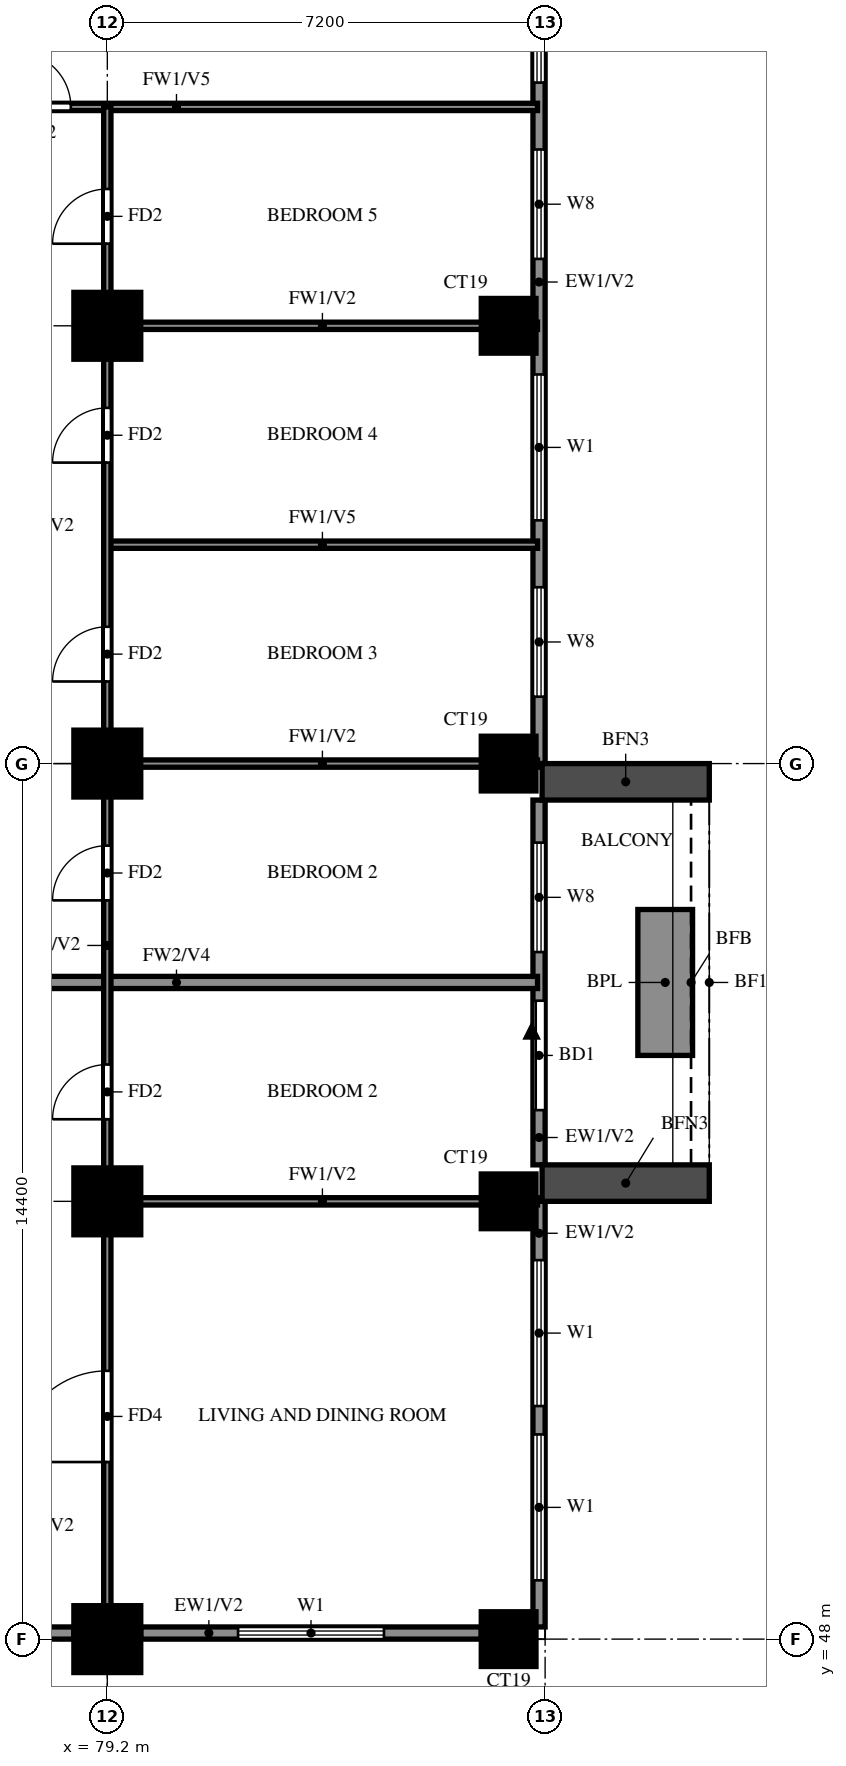
"""IFC4 building model, lengths in metres.
Left out: names, types, materials, properties, quantities, classifications, styles, units other than length and angle.
Written with IfcOpenShell. Run it as: python <this file> out.ifc"""

import sys

from ifc_helpers import new_model, si_unit, direction, frame, frame_2d, origin, origin_2d, place, context, subcontext, project, spatial, rectangle, extrude, source, transform, mapped, element, fill, save


model = new_model("IFC4")
c1 = context("Model", 3, precision=1e-05, world=origin(), true_north=direction((0.0, 1.0)))
c2 = subcontext(c1, "Body", "Model", "MODEL_VIEW")
j1 = project(units=[si_unit("LENGTHUNIT", "METRE"), si_unit("PLANEANGLEUNIT", "RADIAN")], contexts=[c1])
p1 = place(None, origin())
s1 = spatial("IfcSite", under=j1, at=p1, CompositionType="ELEMENT")
p2 = place(p1, origin())
s2 = spatial("IfcBuilding", under=s1, at=p2, CompositionType="ELEMENT")
p3 = place(p2, frame((0.0, 0.0, 123.5)))
s3 = spatial("IfcBuildingStorey", under=s2, at=p3, CompositionType="ELEMENT", Elevation=123.5)
m1 = source(origin(), c2, "Body", "SweptSolid", [
    extrude(rectangle(XDim=1.1, YDim=1.1, at=origin_2d()), origin(), (0.0, 0.0, 1.0), 3.2),
])
p4 = place(p3, frame((79.2, 48.0, 0.0), z_axis=(0.0, 0.0, 1.0), x_axis=(1.0, 0.0, 0.0)))
e1 = element("IfcColumn", 1, at=p4, inside=s3, PredefinedType="COLUMN", context=c2, shape_type="MappedRepresentation", body=[
    mapped(m1, transform((0.0, 0.0, 0.0))),
])
m2 = source(origin(), c2, "Body", "SweptSolid", [
    extrude(rectangle(XDim=0.9, YDim=0.9, at=origin_2d()), origin(), (0.0, 0.0, 1.0), 3.2),
])
p5 = place(p3, frame((85.8, 48.0, 0.0), z_axis=(0.0, 0.0, 1.0), x_axis=(1.0, 0.0, 0.0)))
e2 = element("IfcColumn", 2, at=p5, inside=s3, PredefinedType="COLUMN", context=c2, shape_type="MappedRepresentation", body=[
    mapped(m2, transform((0.0, 0.0, 0.0))),
])
p6 = place(p3, frame((79.2, 55.2, 0.0), z_axis=(0.0, 0.0, 1.0), x_axis=(1.0, 0.0, 0.0)))
e3 = element("IfcColumn", 3, at=p6, inside=s3, PredefinedType="COLUMN", context=c2, shape_type="MappedRepresentation", body=[
    mapped(m1, transform((0.0, 0.0, 0.0))),
])
p7 = place(p3, frame((85.8, 55.2, 0.0), z_axis=(0.0, 0.0, 1.0), x_axis=(1.0, 0.0, 0.0)))
e4 = element("IfcColumn", 4, at=p7, inside=s3, PredefinedType="COLUMN", context=c2, shape_type="MappedRepresentation", body=[
    mapped(m2, transform((0.0, 0.0, 0.0))),
])
p8 = place(p3, frame((79.2, 62.4, 0.0), z_axis=(0.0, 0.0, 1.0), x_axis=(1.0, 0.0, 0.0)))
e5 = element("IfcColumn", 5, at=p8, inside=s3, PredefinedType="COLUMN", context=c2, shape_type="MappedRepresentation", body=[
    mapped(m1, transform((0.0, 0.0, 0.0))),
])
p9 = place(p3, frame((85.8, 62.4, 0.0), z_axis=(0.0, 0.0, 1.0), x_axis=(1.0, 0.0, 0.0)))
e6 = element("IfcColumn", 6, at=p9, inside=s3, PredefinedType="COLUMN", context=c2, shape_type="MappedRepresentation", body=[
    mapped(m2, transform((0.0, 0.0, 0.0))),
])
p10 = place(p3, frame((79.2, 69.6, 0.0), z_axis=(0.0, 0.0, 1.0), x_axis=(1.0, 0.0, 0.0)))
e7 = element("IfcColumn", 7, at=p10, inside=s3, PredefinedType="COLUMN", context=c2, shape_type="MappedRepresentation", body=[
    mapped(m1, transform((0.0, 0.0, 0.0))),
])
p11 = place(p3, frame((85.8, 69.6, 0.0), z_axis=(0.0, 0.0, 1.0), x_axis=(1.0, 0.0, 0.0)))
e8 = element("IfcColumn", 8, at=p11, inside=s3, PredefinedType="COLUMN", context=c2, shape_type="MappedRepresentation", body=[
    mapped(m2, transform((0.0, 0.0, 0.0))),
])
p12 = place(p3, frame((85.719, 39.881, 0.0), z_axis=(0.0, 0.0, 1.0), x_axis=(-0.86377618652, 0.503875678716, 0.0)))
e9 = element("IfcWall", 9, at=p12, inside=s3, PredefinedType="SOLIDWALL", context=c2, shape_type="SweptSolid", body=[
    extrude(rectangle(XDim=16.311, YDim=0.2, at=frame_2d((8.156, 0.0))), origin(), (0.0, 0.0, 1.0), 3.2),
])
p13 = place(p12, frame((13.326, 0.0, 1.5)))
e10 = element("IfcOpeningElement", 10, at=p13, cuts=e9, PredefinedType="OPENING", context=c2, shape_type="SweptSolid", body=[
    extrude(rectangle(XDim=0.9, YDim=0.9, at=frame_2d((0.45, 0.45))), frame((0.0, 0.11, 0.0), z_axis=(0.0, -1.0, 0.0), x_axis=(1.0, 0.0, 0.0)), (0.0, 0.0, 1.0), 0.22),
])
p14 = place(p3, frame((71.99, 48.1, 0.0), z_axis=(0.0, 0.0, 1.0), x_axis=(1.0, 0.0, 0.0)))
e11 = element("IfcWall", 11, at=p14, inside=s3, PredefinedType="SOLIDWALL", context=c2, shape_type="SweptSolid", body=[
    extrude(rectangle(XDim=6.66, YDim=0.2, at=frame_2d((3.33, 0.0))), origin(), (0.0, 0.0, 1.0), 3.2),
])
p15 = place(p3, frame((79.75, 48.1, 0.0), z_axis=(0.0, 0.0, 1.0), x_axis=(1.0, 0.0, 0.0)))
e12 = element("IfcWall", 12, at=p15, inside=s3, PredefinedType="SOLIDWALL", context=c2, shape_type="SweptSolid", body=[
    extrude(rectangle(XDim=5.6, YDim=0.2, at=frame_2d((2.8, 0.0))), origin(), (0.0, 0.0, 1.0), 3.2),
])
p16 = place(p15, frame((1.6, 0.0, 0.6)))
e13 = element("IfcOpeningElement", 13, at=p16, cuts=e12, PredefinedType="OPENING", context=c2, shape_type="SweptSolid", body=[
    extrude(rectangle(XDim=2.4, YDim=2.4, at=frame_2d((1.2, 1.2))), frame((0.0, 0.11, 0.0), z_axis=(0.0, -1.0, 0.0), x_axis=(1.0, 0.0, 0.0)), (0.0, 0.0, 1.0), 0.22),
])
p17 = place(p3, frame((86.3, 48.2, 0.0), z_axis=(0.0, 0.0, 1.0), x_axis=(0.0, 1.0, 0.0)))
e14 = element("IfcWall", 14, at=p17, inside=s3, PredefinedType="SOLIDWALL", context=c2, shape_type="SweptSolid", body=[
    extrude(rectangle(XDim=7.0, YDim=0.2, at=frame_2d((3.5, 0.0))), origin(), (0.0, 0.0, 1.0), 3.2),
])
p18 = place(p17, frame((0.767, 0.0, 0.6)))
e15 = element("IfcOpeningElement", 15, at=p18, cuts=e14, PredefinedType="OPENING", context=c2, shape_type="SweptSolid", body=[
    extrude(rectangle(XDim=2.4, YDim=2.4, at=frame_2d((1.2, 1.2))), frame((0.0, 0.11, 0.0), z_axis=(0.0, -1.0, 0.0), x_axis=(1.0, 0.0, 0.0)), (0.0, 0.0, 1.0), 0.22),
])
p19 = place(p17, frame((3.633, 0.0, 0.6)))
e16 = element("IfcOpeningElement", 16, at=p19, cuts=e14, PredefinedType="OPENING", context=c2, shape_type="SweptSolid", body=[
    extrude(rectangle(XDim=2.4, YDim=2.4, at=frame_2d((1.2, 1.2))), frame((0.0, 0.11, 0.0), z_axis=(0.0, -1.0, 0.0), x_axis=(1.0, 0.0, 0.0)), (0.0, 0.0, 1.0), 0.22),
])
p20 = place(p3, frame((86.3, 55.8, 0.0), z_axis=(0.0, 0.0, 1.0), x_axis=(0.0, 1.0, 0.0)))
e17 = element("IfcWall", 17, at=p20, inside=s3, PredefinedType="SOLIDWALL", context=c2, shape_type="SweptSolid", body=[
    extrude(rectangle(XDim=6.0, YDim=0.2, at=frame_2d((3.0, 0.0))), origin(), (0.0, 0.0, 1.0), 3.2),
])
p21 = place(p20, frame((0.9, 0.0, 0.0)))
e18 = element("IfcOpeningElement", 18, at=p21, cuts=e17, PredefinedType="OPENING", context=c2, shape_type="SweptSolid", body=[
    extrude(rectangle(XDim=1.8, YDim=2.4, at=frame_2d((0.9, 1.2))), frame((0.0, 0.11, 0.0), z_axis=(0.0, -1.0, 0.0), x_axis=(1.0, 0.0, 0.0)), (0.0, 0.0, 1.0), 0.22),
])
p22 = place(p20, frame((3.5, 0.0, 0.6)))
e19 = element("IfcOpeningElement", 19, at=p22, cuts=e17, PredefinedType="OPENING", context=c2, shape_type="SweptSolid", body=[
    extrude(rectangle(XDim=1.8, YDim=2.4, at=frame_2d((0.9, 1.2))), frame((0.0, 0.11, 0.0), z_axis=(0.0, -1.0, 0.0), x_axis=(1.0, 0.0, 0.0)), (0.0, 0.0, 1.0), 0.22),
])
p23 = place(p3, frame((86.3, 62.4, 0.0), z_axis=(0.0, 0.0, 1.0), x_axis=(0.0, 1.0, 0.0)))
e20 = element("IfcWall", 20, at=p23, inside=s3, PredefinedType="SOLIDWALL", context=c2, shape_type="SweptSolid", body=[
    extrude(rectangle(XDim=14.4, YDim=0.2, at=frame_2d((7.2, 0.0))), origin(), (0.0, 0.0, 1.0), 3.2),
])
p24 = place(p23, frame((1.1, 0.0, 0.6)))
e21 = element("IfcOpeningElement", 21, at=p24, cuts=e20, PredefinedType="OPENING", context=c2, shape_type="SweptSolid", body=[
    extrude(rectangle(XDim=1.8, YDim=2.4, at=frame_2d((0.9, 1.2))), frame((0.0, 0.11, 0.0), z_axis=(0.0, -1.0, 0.0), x_axis=(1.0, 0.0, 0.0)), (0.0, 0.0, 1.0), 0.22),
])
p25 = place(p23, frame((4.0, 0.0, 0.6)))
e22 = element("IfcOpeningElement", 22, at=p25, cuts=e20, PredefinedType="OPENING", context=c2, shape_type="SweptSolid", body=[
    extrude(rectangle(XDim=2.4, YDim=2.4, at=frame_2d((1.2, 1.2))), frame((0.0, 0.11, 0.0), z_axis=(0.0, -1.0, 0.0), x_axis=(1.0, 0.0, 0.0)), (0.0, 0.0, 1.0), 0.22),
])
p26 = place(p23, frame((8.3, 0.0, 0.6)))
e23 = element("IfcOpeningElement", 23, at=p26, cuts=e20, PredefinedType="OPENING", context=c2, shape_type="SweptSolid", body=[
    extrude(rectangle(XDim=1.8, YDim=2.4, at=frame_2d((0.9, 1.2))), frame((0.0, 0.11, 0.0), z_axis=(0.0, -1.0, 0.0), x_axis=(1.0, 0.0, 0.0)), (0.0, 0.0, 1.0), 0.22),
])
p27 = place(p23, frame((11.2, 0.0, 0.6)))
e24 = element("IfcOpeningElement", 24, at=p27, cuts=e20, PredefinedType="OPENING", context=c2, shape_type="SweptSolid", body=[
    extrude(rectangle(XDim=2.4, YDim=2.4, at=frame_2d((1.2, 1.2))), frame((0.0, 0.11, 0.0), z_axis=(0.0, -1.0, 0.0), x_axis=(1.0, 0.0, 0.0)), (0.0, 0.0, 1.0), 0.22),
])
for number, where, z_axis, x_axis in (
    (25, (86.35, 55.5, 0.0), (0.0, 0.0, 1.0), (1.0, 0.0, 0.0)),
    (26, (86.35, 62.1, 0.0), (0.0, 0.0, 1.0), (1.0, 0.0, 0.0)),
):
    element("IfcWall", number, at=place(p3, frame(where, z_axis=z_axis, x_axis=x_axis)), inside=s3, PredefinedType="SOLIDWALL", context=c2, shape_type="SweptSolid", body=[
        extrude(rectangle(XDim=2.75, YDim=0.6, at=frame_2d((1.375, 0.0))), origin(), (0.0, 0.0, 1.0), 2.85),
    ])
p28 = place(p3, frame((88.375, 57.6, 0.0), z_axis=(0.0, 0.0, 1.0), x_axis=(0.0, 1.0, 0.0)))
e27 = element("IfcWall", 27, at=p28, inside=s3, PredefinedType="SOLIDWALL", context=c2, shape_type="SweptSolid", body=[
    extrude(rectangle(XDim=2.4, YDim=0.9, at=frame_2d((1.2, 0.0))), origin(), (0.0, 0.0, 1.0), 0.9),
])
p29 = place(p3, frame((74.4, 58.8, 0.0), z_axis=(0.0, 0.0, 1.0), x_axis=(1.0, 0.0, 0.0)))
e28 = element("IfcWall", 28, at=p29, inside=s3, PredefinedType="SOLIDWALL", context=c2, shape_type="SweptSolid", body=[
    extrude(rectangle(XDim=11.875, YDim=0.2, at=frame_2d((5.938, 0.0))), origin(), (0.0, 0.0, 1.0), 2.3),
])
for number, where, z_axis, x_axis in (
    (29, (79.2, 55.2, 0.0), (0.0, 0.0, 1.0), (1.0, 0.0, 0.0)),
    (30, (79.2, 62.4, 0.0), (0.0, 0.0, 1.0), (1.0, 0.0, 0.0)),
):
    element("IfcWall", number, at=place(p3, frame(where, z_axis=z_axis, x_axis=x_axis)), inside=s3, PredefinedType="PARTITIONING", context=c2, shape_type="SweptSolid", body=[
        extrude(rectangle(XDim=7.075, YDim=0.12, at=frame_2d((3.538, 0.0))), origin(), (0.0, 0.0, 1.0), 3.2),
    ])
p30 = place(p3, frame((79.2, 66.0, 0.0), z_axis=(0.0, 0.0, 1.0), x_axis=(1.0, 0.0, 0.0)))
e31 = element("IfcWall", 31, at=p30, inside=s3, PredefinedType="PARTITIONING", context=c2, shape_type="SweptSolid", body=[
    extrude(rectangle(XDim=7.075, YDim=0.12, at=frame_2d((3.538, 0.0))), origin(), (0.0, 0.0, 1.0), 2.3),
])
p31 = place(p3, frame((79.2, 69.6, 0.0), z_axis=(0.0, 0.0, 1.0), x_axis=(1.0, 0.0, 0.0)))
e32 = element("IfcWall", 32, at=p31, inside=s3, PredefinedType="PARTITIONING", context=c2, shape_type="SweptSolid", body=[
    extrude(rectangle(XDim=7.075, YDim=0.12, at=frame_2d((3.538, 0.0))), origin(), (0.0, 0.0, 1.0), 3.2),
])
p32 = place(p3, frame((74.4, 73.2, 0.0), z_axis=(0.0, 0.0, 1.0), x_axis=(1.0, 0.0, 0.0)))
e33 = element("IfcWall", 33, at=p32, inside=s3, PredefinedType="PARTITIONING", context=c2, shape_type="SweptSolid", body=[
    extrude(rectangle(XDim=11.875, YDim=0.12, at=frame_2d((5.938, 0.0))), origin(), (0.0, 0.0, 1.0), 2.3),
])
p33 = place(p32, frame((3.3, 0.0, 0.0)))
e34 = element("IfcOpeningElement", 34, at=p33, cuts=e33, PredefinedType="OPENING", context=c2, shape_type="SweptSolid", body=[
    extrude(rectangle(XDim=0.9, YDim=2.1, at=frame_2d((0.45, 1.05))), frame((0.0, 0.07, 0.0), z_axis=(0.0, -1.0, 0.0), x_axis=(1.0, 0.0, 0.0)), (0.0, 0.0, 1.0), 0.14),
])
p34 = place(p3, frame((79.2, 48.125, 0.0), z_axis=(0.0, 0.0, 1.0), x_axis=(0.0, 1.0, 0.0)))
e35 = element("IfcWall", 35, at=p34, inside=s3, PredefinedType="PARTITIONING", context=c2, shape_type="SweptSolid", body=[
    extrude(rectangle(XDim=25.075, YDim=0.12, at=frame_2d((12.538, 0.0))), origin(), (0.0, 0.0, 1.0), 3.2),
])
p35 = place(p34, frame((2.788, 0.0, 0.0)))
e36 = element("IfcOpeningElement", 36, at=p35, cuts=e35, PredefinedType="OPENING", context=c2, shape_type="SweptSolid", body=[
    extrude(rectangle(XDim=1.5, YDim=2.1, at=frame_2d((0.75, 1.05))), frame((0.0, 0.07, 0.0), z_axis=(0.0, -1.0, 0.0), x_axis=(1.0, 0.0, 0.0)), (0.0, 0.0, 1.0), 0.14),
])
p36 = place(p34, frame((8.425, 0.0, 0.0)))
e37 = element("IfcOpeningElement", 37, at=p36, cuts=e35, PredefinedType="OPENING", context=c2, shape_type="SweptSolid", body=[
    extrude(rectangle(XDim=0.9, YDim=2.1, at=frame_2d((0.45, 1.05))), frame((0.0, 0.07, 0.0), z_axis=(0.0, -1.0, 0.0), x_axis=(1.0, 0.0, 0.0)), (0.0, 0.0, 1.0), 0.14),
])
p37 = place(p34, frame((12.025, 0.0, 0.0)))
e38 = element("IfcOpeningElement", 38, at=p37, cuts=e35, PredefinedType="OPENING", context=c2, shape_type="SweptSolid", body=[
    extrude(rectangle(XDim=0.9, YDim=2.1, at=frame_2d((0.45, 1.05))), frame((0.0, 0.07, 0.0), z_axis=(0.0, -1.0, 0.0), x_axis=(1.0, 0.0, 0.0)), (0.0, 0.0, 1.0), 0.14),
])
p38 = place(p34, frame((15.625, 0.0, 0.0)))
e39 = element("IfcOpeningElement", 39, at=p38, cuts=e35, PredefinedType="OPENING", context=c2, shape_type="SweptSolid", body=[
    extrude(rectangle(XDim=0.9, YDim=2.1, at=frame_2d((0.45, 1.05))), frame((0.0, 0.07, 0.0), z_axis=(0.0, -1.0, 0.0), x_axis=(1.0, 0.0, 0.0)), (0.0, 0.0, 1.0), 0.14),
])
p39 = place(p34, frame((19.225, 0.0, 0.0)))
e40 = element("IfcOpeningElement", 40, at=p39, cuts=e35, PredefinedType="OPENING", context=c2, shape_type="SweptSolid", body=[
    extrude(rectangle(XDim=0.9, YDim=2.1, at=frame_2d((0.45, 1.05))), frame((0.0, 0.07, 0.0), z_axis=(0.0, -1.0, 0.0), x_axis=(1.0, 0.0, 0.0)), (0.0, 0.0, 1.0), 0.14),
])
p40 = place(p34, frame((22.825, 0.0, 0.0)))
e41 = element("IfcOpeningElement", 41, at=p40, cuts=e35, PredefinedType="OPENING", context=c2, shape_type="SweptSolid", body=[
    extrude(rectangle(XDim=0.9, YDim=2.1, at=frame_2d((0.45, 1.05))), frame((0.0, 0.07, 0.0), z_axis=(0.0, -1.0, 0.0), x_axis=(1.0, 0.0, 0.0)), (0.0, 0.0, 1.0), 0.14),
])
p41 = place(p16, origin())
e42 = element("IfcWindow", 42, at=p41, inside=s3, PartitioningType="DOUBLE_PANEL_VERTICAL", PredefinedType="WINDOW", context=c2, shape_type="SweptSolid", body=[
    extrude(rectangle(XDim=2.4, YDim=2.4, at=frame_2d((1.2, 1.2))), frame((0.0, 0.03, 0.0), z_axis=(0.0, -1.0, 0.0), x_axis=(1.0, 0.0, 0.0)), (0.0, 0.0, 1.0), 0.06),
])
fill(e13, e42)
p42 = place(p18, origin())
e43 = element("IfcWindow", 43, at=p42, inside=s3, PartitioningType="DOUBLE_PANEL_VERTICAL", PredefinedType="WINDOW", context=c2, shape_type="SweptSolid", body=[
    extrude(rectangle(XDim=2.4, YDim=2.4, at=frame_2d((1.2, 1.2))), frame((0.0, 0.03, 0.0), z_axis=(0.0, -1.0, 0.0), x_axis=(1.0, 0.0, 0.0)), (0.0, 0.0, 1.0), 0.06),
])
fill(e15, e43)
p43 = place(p19, origin())
e44 = element("IfcWindow", 44, at=p43, inside=s3, PartitioningType="DOUBLE_PANEL_VERTICAL", PredefinedType="WINDOW", context=c2, shape_type="SweptSolid", body=[
    extrude(rectangle(XDim=2.4, YDim=2.4, at=frame_2d((1.2, 1.2))), frame((0.0, 0.03, 0.0), z_axis=(0.0, -1.0, 0.0), x_axis=(1.0, 0.0, 0.0)), (0.0, 0.0, 1.0), 0.06),
])
fill(e16, e44)
p44 = place(p21, origin())
e45 = element("IfcDoor", 45, at=p44, inside=s3, OperationType="DOUBLE_DOOR_SLIDING", PredefinedType="DOOR", context=c2, shape_type="SweptSolid", body=[
    extrude(rectangle(XDim=1.8, YDim=2.4, at=frame_2d((0.9, 1.2))), frame((0.0, 0.025, 0.0), z_axis=(0.0, -1.0, 0.0), x_axis=(1.0, 0.0, 0.0)), (0.0, 0.0, 1.0), 0.05),
])
fill(e18, e45)
p45 = place(p22, origin())
e46 = element("IfcWindow", 46, at=p45, inside=s3, PartitioningType="DOUBLE_PANEL_VERTICAL", PredefinedType="WINDOW", context=c2, shape_type="SweptSolid", body=[
    extrude(rectangle(XDim=1.8, YDim=2.4, at=frame_2d((0.9, 1.2))), frame((0.0, 0.03, 0.0), z_axis=(0.0, -1.0, 0.0), x_axis=(1.0, 0.0, 0.0)), (0.0, 0.0, 1.0), 0.06),
])
fill(e19, e46)
p46 = place(p24, origin())
e47 = element("IfcWindow", 47, at=p46, inside=s3, PartitioningType="DOUBLE_PANEL_VERTICAL", PredefinedType="WINDOW", context=c2, shape_type="SweptSolid", body=[
    extrude(rectangle(XDim=1.8, YDim=2.4, at=frame_2d((0.9, 1.2))), frame((0.0, 0.03, 0.0), z_axis=(0.0, -1.0, 0.0), x_axis=(1.0, 0.0, 0.0)), (0.0, 0.0, 1.0), 0.06),
])
fill(e21, e47)
p47 = place(p25, origin())
e48 = element("IfcWindow", 48, at=p47, inside=s3, PartitioningType="DOUBLE_PANEL_VERTICAL", PredefinedType="WINDOW", context=c2, shape_type="SweptSolid", body=[
    extrude(rectangle(XDim=2.4, YDim=2.4, at=frame_2d((1.2, 1.2))), frame((0.0, 0.03, 0.0), z_axis=(0.0, -1.0, 0.0), x_axis=(1.0, 0.0, 0.0)), (0.0, 0.0, 1.0), 0.06),
])
fill(e22, e48)
p48 = place(p26, origin())
e49 = element("IfcWindow", 49, at=p48, inside=s3, PartitioningType="DOUBLE_PANEL_VERTICAL", PredefinedType="WINDOW", context=c2, shape_type="SweptSolid", body=[
    extrude(rectangle(XDim=1.8, YDim=2.4, at=frame_2d((0.9, 1.2))), frame((0.0, 0.03, 0.0), z_axis=(0.0, -1.0, 0.0), x_axis=(1.0, 0.0, 0.0)), (0.0, 0.0, 1.0), 0.06),
])
fill(e23, e49)
p49 = place(p27, origin())
e50 = element("IfcWindow", 50, at=p49, inside=s3, PartitioningType="DOUBLE_PANEL_VERTICAL", PredefinedType="WINDOW", context=c2, shape_type="SweptSolid", body=[
    extrude(rectangle(XDim=2.4, YDim=2.4, at=frame_2d((1.2, 1.2))), frame((0.0, 0.03, 0.0), z_axis=(0.0, -1.0, 0.0), x_axis=(1.0, 0.0, 0.0)), (0.0, 0.0, 1.0), 0.06),
])
fill(e24, e50)
p50 = place(p35, origin())
e51 = element("IfcDoor", 51, at=p50, inside=s3, OperationType="SINGLE_SWING_RIGHT", PredefinedType="DOOR", context=c2, shape_type="SweptSolid", body=[
    extrude(rectangle(XDim=1.5, YDim=2.1, at=frame_2d((0.75, 1.05))), frame((0.0, 0.025, 0.0), z_axis=(0.0, -1.0, 0.0), x_axis=(1.0, 0.0, 0.0)), (0.0, 0.0, 1.0), 0.05),
])
fill(e36, e51)
p51 = place(p36, origin())
e52 = element("IfcDoor", 52, at=p51, inside=s3, OperationType="SINGLE_SWING_LEFT", PredefinedType="DOOR", context=c2, shape_type="SweptSolid", body=[
    extrude(rectangle(XDim=0.9, YDim=2.1, at=frame_2d((0.45, 1.05))), frame((0.0, 0.025, 0.0), z_axis=(0.0, -1.0, 0.0), x_axis=(1.0, 0.0, 0.0)), (0.0, 0.0, 1.0), 0.05),
])
fill(e37, e52)
p52 = place(p37, origin())
e53 = element("IfcDoor", 53, at=p52, inside=s3, OperationType="SINGLE_SWING_LEFT", PredefinedType="DOOR", context=c2, shape_type="SweptSolid", body=[
    extrude(rectangle(XDim=0.9, YDim=2.1, at=frame_2d((0.45, 1.05))), frame((0.0, 0.025, 0.0), z_axis=(0.0, -1.0, 0.0), x_axis=(1.0, 0.0, 0.0)), (0.0, 0.0, 1.0), 0.05),
])
fill(e38, e53)
p53 = place(p38, origin())
e54 = element("IfcDoor", 54, at=p53, inside=s3, OperationType="SINGLE_SWING_LEFT", PredefinedType="DOOR", context=c2, shape_type="SweptSolid", body=[
    extrude(rectangle(XDim=0.9, YDim=2.1, at=frame_2d((0.45, 1.05))), frame((0.0, 0.025, 0.0), z_axis=(0.0, -1.0, 0.0), x_axis=(1.0, 0.0, 0.0)), (0.0, 0.0, 1.0), 0.05),
])
fill(e39, e54)
p54 = place(p39, origin())
e55 = element("IfcDoor", 55, at=p54, inside=s3, OperationType="SINGLE_SWING_RIGHT", PredefinedType="DOOR", context=c2, shape_type="SweptSolid", body=[
    extrude(rectangle(XDim=0.9, YDim=2.1, at=frame_2d((0.45, 1.05))), frame((0.0, 0.025, 0.0), z_axis=(0.0, -1.0, 0.0), x_axis=(1.0, 0.0, 0.0)), (0.0, 0.0, 1.0), 0.05),
])
fill(e40, e55)
p55 = place(p40, origin())
e56 = element("IfcDoor", 56, at=p55, inside=s3, OperationType="SINGLE_SWING_LEFT", PredefinedType="DOOR", context=c2, shape_type="SweptSolid", body=[
    extrude(rectangle(XDim=0.9, YDim=2.1, at=frame_2d((0.45, 1.05))), frame((0.0, 0.025, 0.0), z_axis=(0.0, -1.0, 0.0), x_axis=(1.0, 0.0, 0.0)), (0.0, 0.0, 1.0), 0.05),
])
fill(e41, e56)
p56 = place(p33, origin())
e57 = element("IfcDoor", 57, at=p56, inside=s3, OperationType="SINGLE_SWING_LEFT", PredefinedType="DOOR", context=c2, shape_type="SweptSolid", body=[
    extrude(rectangle(XDim=0.9, YDim=2.1, at=frame_2d((0.45, 1.05))), frame((0.0, 0.025, 0.0), z_axis=(0.0, -1.0, 0.0), x_axis=(1.0, 0.0, 0.0)), (0.0, 0.0, 1.0), 0.05),
])
fill(e34, e57)
save(model, sys.argv[1])
